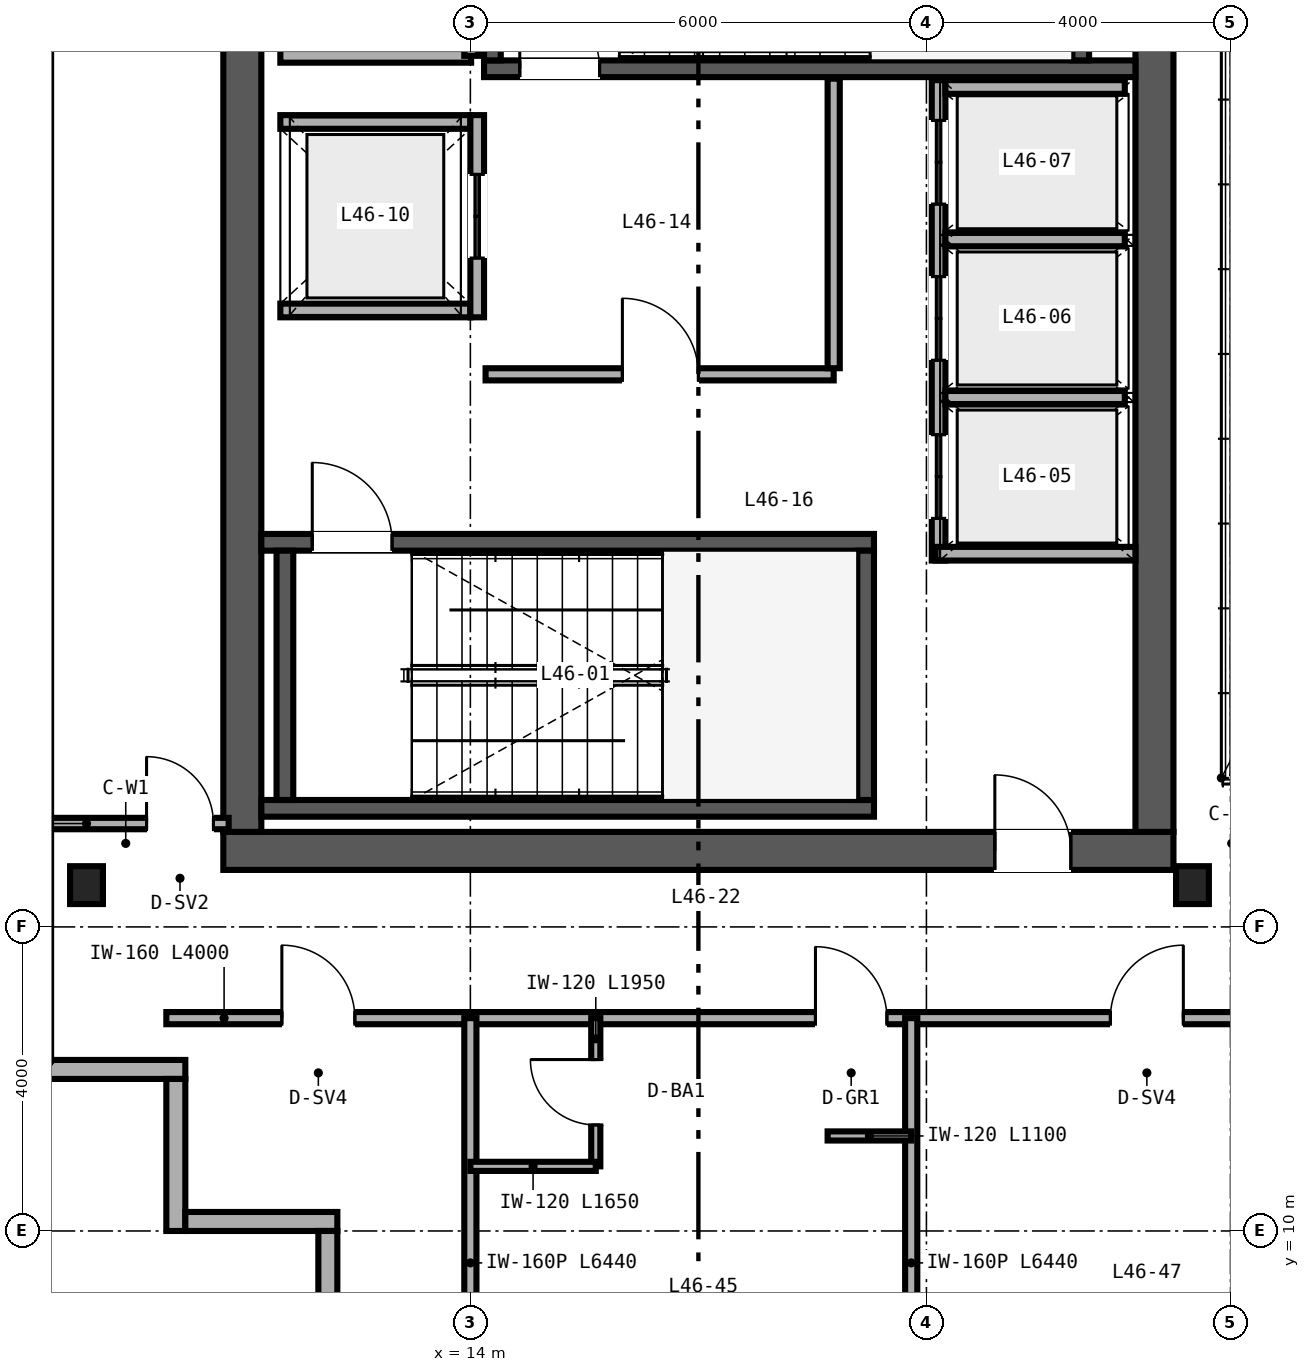
"""IFC4 building model, lengths in metres.
Left out: names, types, materials, properties, quantities, classifications, styles, units other than length and angle.
Written with IfcOpenShell. Run it as: python <this file> out.ifc"""

import sys

from ifc_helpers import new_model, si_unit, direction, frame, frame_2d, origin, origin_2d, place, context, subcontext, project, spatial, rectangle, i_section, extrude, source, transform, mapped, element, fill, save


model = new_model("IFC4")
c1 = context("Model", 3, precision=1e-05, world=origin(), true_north=direction((0.0, 1.0)))
c2 = subcontext(c1, "Body", "Model", "MODEL_VIEW")
j1 = project(units=[si_unit("LENGTHUNIT", "METRE"), si_unit("PLANEANGLEUNIT", "RADIAN")], contexts=[c1])
p1 = place(None, origin())
s1 = spatial("IfcSite", under=j1, at=p1, CompositionType="ELEMENT")
p2 = place(p1, origin())
s2 = spatial("IfcBuilding", under=s1, at=p2, CompositionType="ELEMENT")
p3 = place(p2, frame((0.0, 0.0, 184.8)))
s3 = spatial("IfcBuildingStorey", under=s2, at=p3, CompositionType="ELEMENT", Elevation=184.8)
p4 = place(p3, frame((10.75, 15.0, 0.0), z_axis=(0.0, 0.0, 1.0), x_axis=(1.0, 0.0, 0.0)))
e1 = element("IfcWall", 1, at=p4, inside=s3, PredefinedType="SHEAR", context=c2, shape_type="SweptSolid", body=[
    extrude(rectangle(XDim=12.5, YDim=0.5, at=frame_2d((6.25, 0.0))), origin(), (0.0, 0.0, 1.0), 3.37),
])
p5 = place(p4, frame((10.15, 0.0, 0.0)))
e2 = element("IfcOpeningElement", 2, at=p5, cuts=e1, PredefinedType="OPENING", context=c2, shape_type="SweptSolid", body=[
    extrude(rectangle(XDim=1.0, YDim=2.15, at=frame_2d((0.5, 1.075))), frame((0.0, 0.26, 0.0), z_axis=(0.0, -1.0, 0.0), x_axis=(1.0, 0.0, 0.0)), (0.0, 0.0, 1.0), 0.52),
])
for number, where, z_axis, x_axis in (
    (3, (11.0, 15.25, 0.0), (0.0, 0.0, 1.0), (0.0, 1.0, 0.0)),
    (4, (23.0, 15.25, 0.0), (0.0, 0.0, 1.0), (0.0, 1.0, 0.0)),
):
    element("IfcWall", number, at=place(p3, frame(where, z_axis=z_axis, x_axis=x_axis)), inside=s3, PredefinedType="SHEAR", context=c2, shape_type="SweptSolid", body=[
        extrude(rectangle(XDim=21.5, YDim=0.5, at=frame_2d((10.75, 0.0))), origin(), (0.0, 0.0, 1.0), 3.37),
    ])
p6 = place(p3, frame((11.25, 15.56, 0.0), z_axis=(0.0, 0.0, 1.0), x_axis=(1.0, 0.0, 0.0)))
e5 = element("IfcWall", 5, at=p6, inside=s3, PredefinedType="SHEAR", context=c2, shape_type="SweptSolid", body=[
    extrude(rectangle(XDim=8.06, YDim=0.22, at=frame_2d((4.03, 0.0))), origin(), (0.0, 0.0, 1.0), 3.4),
])
p7 = place(p3, frame((11.25, 19.06, 0.0), z_axis=(0.0, 0.0, 1.0), x_axis=(1.0, 0.0, 0.0)))
e6 = element("IfcWall", 6, at=p7, inside=s3, PredefinedType="SHEAR", context=c2, shape_type="SweptSolid", body=[
    extrude(rectangle(XDim=8.06, YDim=0.22, at=frame_2d((4.03, 0.0))), origin(), (0.0, 0.0, 1.0), 3.4),
])
p8 = place(p7, frame((0.67, 0.0, 0.0)))
e7 = element("IfcOpeningElement", 7, at=p8, cuts=e6, PredefinedType="OPENING", context=c2, shape_type="SweptSolid", body=[
    extrude(rectangle(XDim=1.05, YDim=2.15, at=frame_2d((0.525, 1.075))), frame((0.0, 0.12, 0.0), z_axis=(0.0, -1.0, 0.0), x_axis=(1.0, 0.0, 0.0)), (0.0, 0.0, 1.0), 0.24),
])
for number, where, z_axis, x_axis in (
    (8, (11.56, 15.67, 0.0), (0.0, 0.0, 1.0), (0.0, 1.0, 0.0)),
    (9, (19.2, 15.67, 0.0), (0.0, 0.0, 1.0), (0.0, 1.0, 0.0)),
):
    element("IfcWall", number, at=place(p3, frame(where, z_axis=z_axis, x_axis=x_axis)), inside=s3, PredefinedType="SHEAR", context=c2, shape_type="SweptSolid", body=[
        extrude(rectangle(XDim=3.28, YDim=0.22, at=frame_2d((1.64, 0.0))), origin(), (0.0, 0.0, 1.0), 3.4),
    ])
p9 = place(p3, frame((14.18, 25.29, 0.0), z_axis=(0.0, 0.0, 1.0), x_axis=(1.0, 0.0, 0.0)))
e10 = element("IfcWall", 10, at=p9, inside=s3, PredefinedType="SHEAR", context=c2, shape_type="SweptSolid", body=[
    extrude(rectangle(XDim=8.57, YDim=0.22, at=frame_2d((4.285, 0.0))), origin(), (0.0, 0.0, 1.0), 3.4),
])
p10 = place(p9, frame((0.47, 0.0, 0.0)))
e11 = element("IfcOpeningElement", 11, at=p10, cuts=e10, PredefinedType="OPENING", context=c2, shape_type="SweptSolid", body=[
    extrude(rectangle(XDim=1.05, YDim=2.15, at=frame_2d((0.525, 1.075))), frame((0.0, 0.12, 0.0), z_axis=(0.0, -1.0, 0.0), x_axis=(1.0, 0.0, 0.0)), (0.0, 0.0, 1.0), 0.24),
])
for number, where, z_axis, x_axis in (
    (12, (14.29, 25.4, 0.0), (0.0, 0.0, 1.0), (0.0, 1.0, 0.0)),
    (13, (22.03, 25.4, 0.0), (0.0, 0.0, 1.0), (0.0, 1.0, 0.0)),
):
    element("IfcWall", number, at=place(p3, frame(where, z_axis=z_axis, x_axis=x_axis)), inside=s3, PredefinedType="SHEAR", context=c2, shape_type="SweptSolid", body=[
        extrude(rectangle(XDim=3.28, YDim=0.22, at=frame_2d((1.64, 0.0))), origin(), (0.0, 0.0, 1.0), 3.4),
    ])
m1 = source(origin(), c2, "Body", "SweptSolid", [
    extrude(i_section(OverallWidth=0.432, OverallDepth=0.498, WebThickness=0.056, FlangeThickness=0.089, FilletRadius=0.025, at=origin_2d()), origin(), (0.0, 0.0, 1.0), 3.37),
])
for number, where, z_axis, x_axis in (
    (14, (8.95, 14.55, 0.0), (0.0, 0.0, 1.0), (1.0, 0.0, 0.0)),
    (15, (23.5, 14.55, 0.0), (0.0, 0.0, 1.0), (1.0, 0.0, 0.0)),
):
    element("IfcColumn", number, at=place(p3, frame(where, z_axis=z_axis, x_axis=x_axis)), inside=s3, PredefinedType="COLUMN", context=c2, shape_type="MappedRepresentation", body=[
        mapped(m1, transform((0.0, 0.0, 0.0), scale=1.0)),
    ])
p11 = place(p3, frame((8.0, 12.125, 0.0), z_axis=(0.0, 0.0, 1.0), x_axis=(1.0, 0.0, 0.0)))
e16 = element("IfcWall", 16, at=p11, inside=s3, PredefinedType="SOLIDWALL", context=c2, shape_type="SweptSolid", body=[
    extrude(rectangle(XDim=2.25, YDim=0.25, at=frame_2d((1.125, 0.0))), origin(), (0.0, 0.0, 1.0), 3.37),
])
for number, where, z_axis, x_axis in (
    (17, (10.125, 12.0, 0.0), (0.0, 0.0, 1.0), (0.0, -1.0, 0.0)),
    (18, (10.25, 10.125, 0.0), (0.0, 0.0, 1.0), (1.0, 0.0, 0.0)),
    (19, (12.125, 10.0, 0.0), (0.0, 0.0, 1.0), (0.0, -1.0, 0.0)),
):
    element("IfcWall", number, at=place(p3, frame(where, z_axis=z_axis, x_axis=x_axis)), inside=s3, PredefinedType="SOLIDWALL", context=c2, shape_type="SweptSolid", body=[
        extrude(rectangle(XDim=2.0, YDim=0.25, at=frame_2d((1.0, 0.0))), origin(), (0.0, 0.0, 1.0), 3.37),
    ])
p12 = place(p3, frame((20.16, 18.82, 0.0), z_axis=(0.0, 0.0, 1.0), x_axis=(0.0, 1.0, 0.0)))
e20 = element("IfcWall", 20, at=p12, inside=s3, PredefinedType="SOLIDWALL", context=c2, shape_type="SweptSolid", body=[
    extrude(rectangle(XDim=6.32, YDim=0.18, at=frame_2d((3.16, 0.0))), origin(), (0.0, 0.0, 1.0), 2.47),
])
p13 = place(p12, frame((0.555, 0.0, 0.0)))
e21 = element("IfcOpeningElement", 21, at=p13, cuts=e20, PredefinedType="OPENING", context=c2, shape_type="SweptSolid", body=[
    extrude(rectangle(XDim=1.1, YDim=2.2, at=frame_2d((0.55, 1.1))), frame((0.0, 0.1, 0.0), z_axis=(0.0, -1.0, 0.0), x_axis=(1.0, 0.0, 0.0)), (0.0, 0.0, 1.0), 0.2),
])
p14 = place(p12, frame((2.635, 0.0, 0.0)))
e22 = element("IfcOpeningElement", 22, at=p14, cuts=e20, PredefinedType="OPENING", context=c2, shape_type="SweptSolid", body=[
    extrude(rectangle(XDim=1.1, YDim=2.2, at=frame_2d((0.55, 1.1))), frame((0.0, 0.1, 0.0), z_axis=(0.0, -1.0, 0.0), x_axis=(1.0, 0.0, 0.0)), (0.0, 0.0, 1.0), 0.2),
])
p15 = place(p12, frame((4.69, 0.0, 0.0)))
e23 = element("IfcOpeningElement", 23, at=p15, cuts=e20, PredefinedType="OPENING", context=c2, shape_type="SweptSolid", body=[
    extrude(rectangle(XDim=1.1, YDim=2.2, at=frame_2d((0.55, 1.1))), frame((0.0, 0.1, 0.0), z_axis=(0.0, -1.0, 0.0), x_axis=(1.0, 0.0, 0.0)), (0.0, 0.0, 1.0), 0.2),
])
p16 = place(p3, frame((20.12, 18.91, 0.0), z_axis=(0.0, 0.0, 1.0), x_axis=(1.0, 0.0, 0.0)))
e24 = element("IfcWall", 24, at=p16, inside=s3, PredefinedType="SOLIDWALL", context=c2, shape_type="SweptSolid", body=[
    extrude(rectangle(XDim=2.63, YDim=0.18, at=frame_2d((1.315, 0.0))), origin(), (0.0, 0.0, 1.0), 3.37),
])
p17 = place(p3, frame((20.25, 25.05, 0.0), z_axis=(0.0, 0.0, 1.0), x_axis=(1.0, 0.0, 0.0)))
e25 = element("IfcWall", 25, at=p17, inside=s3, PredefinedType="SOLIDWALL", context=c2, shape_type="SweptSolid", body=[
    extrude(rectangle(XDim=2.36, YDim=0.18, at=frame_2d((1.18, 0.0))), origin(), (0.0, 0.0, 1.0), 3.37),
])
p18 = place(p3, frame((20.25, 20.965, 0.0), z_axis=(0.0, 0.0, 1.0), x_axis=(1.0, 0.0, 0.0)))
e26 = element("IfcWall", 26, at=p18, inside=s3, PredefinedType="SOLIDWALL", context=c2, shape_type="SweptSolid", body=[
    extrude(rectangle(XDim=2.36, YDim=0.18, at=frame_2d((1.18, 0.0))), origin(), (0.0, 0.0, 1.0), 2.47),
])
p19 = place(p3, frame((20.25, 23.045, 0.0), z_axis=(0.0, 0.0, 1.0), x_axis=(1.0, 0.0, 0.0)))
e27 = element("IfcWall", 27, at=p19, inside=s3, PredefinedType="SOLIDWALL", context=c2, shape_type="SweptSolid", body=[
    extrude(rectangle(XDim=2.36, YDim=0.18, at=frame_2d((1.18, 0.0))), origin(), (0.0, 0.0, 1.0), 3.37),
])
for number, where, z_axis, x_axis in (
    (28, (11.5, 22.11, 0.0), (0.0, 0.0, 1.0), (1.0, 0.0, 0.0)),
    (29, (11.5, 24.59, 0.0), (0.0, 0.0, 1.0), (1.0, 0.0, 0.0)),
):
    element("IfcWall", number, at=place(p3, frame(where, z_axis=z_axis, x_axis=x_axis)), inside=s3, PredefinedType="SOLIDWALL", context=c2, shape_type="SweptSolid", body=[
        extrude(rectangle(XDim=2.5, YDim=0.18, at=frame_2d((1.25, 0.0))), origin(), (0.0, 0.0, 1.0), 3.37),
    ])
p20 = place(p3, frame((14.09, 22.02, 0.0), z_axis=(0.0, 0.0, 1.0), x_axis=(0.0, 1.0, 0.0)))
e30 = element("IfcWall", 30, at=p20, inside=s3, PredefinedType="SOLIDWALL", context=c2, shape_type="SweptSolid", body=[
    extrude(rectangle(XDim=2.66, YDim=0.18, at=frame_2d((1.33, 0.0))), origin(), (0.0, 0.0, 1.0), 3.37),
])
p21 = place(p20, frame((0.78, 0.0, 0.0)))
e31 = element("IfcOpeningElement", 31, at=p21, cuts=e30, PredefinedType="OPENING", context=c2, shape_type="SweptSolid", body=[
    extrude(rectangle(XDim=1.1, YDim=2.2, at=frame_2d((0.55, 1.1))), frame((0.0, 0.1, 0.0), z_axis=(0.0, -1.0, 0.0), x_axis=(1.0, 0.0, 0.0)), (0.0, 0.0, 1.0), 0.2),
])
p22 = place(p3, frame((11.5, 25.46, 0.0), z_axis=(0.0, 0.0, 1.0), x_axis=(1.0, 0.0, 0.0)))
e32 = element("IfcWall", 32, at=p22, inside=s3, PredefinedType="SOLIDWALL", context=c2, shape_type="SweptSolid", body=[
    extrude(rectangle(XDim=2.51, YDim=0.18, at=frame_2d((1.255, 0.0))), origin(), (0.0, 0.0, 1.0), 3.37),
])
p23 = place(p3, frame((14.01, 25.46, 0.0), z_axis=(0.0, 0.0, 1.0), x_axis=(0.0, 1.0, 0.0)))
e33 = element("IfcWall", 33, at=p23, inside=s3, PredefinedType="SOLIDWALL", context=c2, shape_type="SweptSolid", body=[
    extrude(rectangle(XDim=3.08, YDim=0.18, at=frame_2d((1.54, 0.0))), origin(), (0.0, 0.0, 1.0), 3.37),
])
p24 = place(p3, frame((14.2, 21.27, 0.0), z_axis=(0.0, 0.0, 1.0), x_axis=(1.0, 0.0, 0.0)))
e34 = element("IfcWall", 34, at=p24, inside=s3, PredefinedType="PARTITIONING", context=c2, shape_type="SweptSolid", body=[
    extrude(rectangle(XDim=4.58, YDim=0.16, at=frame_2d((2.29, 0.0))), origin(), (0.0, 0.0, 1.0), 3.37),
])
p25 = place(p24, frame((1.8, 0.0, 0.0)))
e35 = element("IfcOpeningElement", 35, at=p25, cuts=e34, PredefinedType="OPENING", context=c2, shape_type="SweptSolid", body=[
    extrude(rectangle(XDim=1.0, YDim=2.15, at=frame_2d((0.5, 1.075))), frame((0.0, 0.09, 0.0), z_axis=(0.0, -1.0, 0.0), x_axis=(1.0, 0.0, 0.0)), (0.0, 0.0, 1.0), 0.18),
])
p26 = place(p3, frame((18.78, 21.35, 0.0), z_axis=(0.0, 0.0, 1.0), x_axis=(0.0, 1.0, 0.0)))
e36 = element("IfcWall", 36, at=p26, inside=s3, PredefinedType="PARTITIONING", context=c2, shape_type="SweptSolid", body=[
    extrude(rectangle(XDim=3.81, YDim=0.16, at=frame_2d((1.905, 0.0))), origin(), (0.0, 0.0, 1.0), 3.37),
])
p27 = place(p3, frame((8.16, 15.36, 0.0), z_axis=(0.0, 0.0, 1.0), x_axis=(1.0, 0.0, 0.0)))
e37 = element("IfcWall", 37, at=p27, inside=s3, PredefinedType="PARTITIONING", context=c2, shape_type="SweptSolid", body=[
    extrude(rectangle(XDim=2.66, YDim=0.15, at=frame_2d((1.33, 0.0))), origin(), (0.0, 0.0, 1.0), 2.591),
])
p28 = place(p27, frame((1.58, 0.0, 0.0)))
e38 = element("IfcOpeningElement", 38, at=p28, cuts=e37, PredefinedType="OPENING", context=c2, shape_type="SweptSolid", body=[
    extrude(rectangle(XDim=0.88, YDim=2.15, at=frame_2d((0.44, 1.075))), frame((0.0, 0.085, 0.0), z_axis=(0.0, -1.0, 0.0), x_axis=(1.0, 0.0, 0.0)), (0.0, 0.0, 1.0), 0.17),
])
p29 = place(p3, frame((10.0, 12.8, 0.0), z_axis=(0.0, 0.0, 1.0), x_axis=(1.0, 0.0, 0.0)))
e39 = element("IfcWall", 39, at=p29, inside=s3, PredefinedType="PARTITIONING", context=c2, shape_type="SweptSolid", body=[
    extrude(rectangle(XDim=4.0, YDim=0.16, at=frame_2d((2.0, 0.0))), origin(), (0.0, 0.0, 1.0), 3.37),
])
p30 = place(p29, frame((1.52, 0.0, 0.0)))
e40 = element("IfcOpeningElement", 40, at=p30, cuts=e39, PredefinedType="OPENING", context=c2, shape_type="SweptSolid", body=[
    extrude(rectangle(XDim=0.96, YDim=2.15, at=frame_2d((0.48, 1.075))), frame((0.0, 0.09, 0.0), z_axis=(0.0, -1.0, 0.0), x_axis=(1.0, 0.0, 0.0)), (0.0, 0.0, 1.0), 0.18),
])
p31 = place(p3, frame((14.0, 12.8, 0.0), z_axis=(0.0, 0.0, 1.0), x_axis=(1.0, 0.0, 0.0)))
e41 = element("IfcWall", 41, at=p31, inside=s3, PredefinedType="PARTITIONING", context=c2, shape_type="SweptSolid", body=[
    extrude(rectangle(XDim=12.0, YDim=0.16, at=frame_2d((6.0, 0.0))), origin(), (0.0, 0.0, 1.0), 2.913),
])
p32 = place(p31, frame((4.54, 0.0, 0.0)))
e42 = element("IfcOpeningElement", 42, at=p32, cuts=e41, PredefinedType="OPENING", context=c2, shape_type="SweptSolid", body=[
    extrude(rectangle(XDim=0.94, YDim=2.15, at=frame_2d((0.47, 1.075))), frame((0.0, 0.09, 0.0), z_axis=(0.0, -1.0, 0.0), x_axis=(1.0, 0.0, 0.0)), (0.0, 0.0, 1.0), 0.18),
])
p33 = place(p31, frame((8.42, 0.0, 0.0)))
e43 = element("IfcOpeningElement", 43, at=p33, cuts=e41, PredefinedType="OPENING", context=c2, shape_type="SweptSolid", body=[
    extrude(rectangle(XDim=0.96, YDim=2.15, at=frame_2d((0.48, 1.075))), frame((0.0, 0.09, 0.0), z_axis=(0.0, -1.0, 0.0), x_axis=(1.0, 0.0, 0.0)), (0.0, 0.0, 1.0), 0.18),
])
for number, where, z_axis, x_axis in (
    (44, (14.0, 6.36, 0.0), (0.0, 0.0, 1.0), (0.0, 1.0, 0.0)),
    (45, (19.8, 6.36, 0.0), (0.0, 0.0, 1.0), (0.0, 1.0, 0.0)),
):
    element("IfcWall", number, at=place(p3, frame(where, z_axis=z_axis, x_axis=x_axis)), inside=s3, PredefinedType="PARTITIONING", context=c2, shape_type="SweptSolid", body=[
        extrude(rectangle(XDim=6.44, YDim=0.16, at=frame_2d((3.22, 0.0))), origin(), (0.0, 0.0, 1.0), 2.677),
    ])
p34 = place(p3, frame((15.65, 10.85, 0.0), z_axis=(0.0, 0.0, 1.0), x_axis=(0.0, 1.0, 0.0)))
e46 = element("IfcWall", 46, at=p34, inside=s3, PredefinedType="PARTITIONING", context=c2, shape_type="SweptSolid", body=[
    extrude(rectangle(XDim=1.95, YDim=0.12, at=frame_2d((0.975, 0.0))), origin(), (0.0, 0.0, 1.0), 3.37),
])
p35 = place(p34, frame((0.545, 0.0, 0.0)))
e47 = element("IfcOpeningElement", 47, at=p35, cuts=e46, PredefinedType="OPENING", context=c2, shape_type="SweptSolid", body=[
    extrude(rectangle(XDim=0.86, YDim=2.1, at=frame_2d((0.43, 1.05))), frame((0.0, 0.07, 0.0), z_axis=(0.0, -1.0, 0.0), x_axis=(1.0, 0.0, 0.0)), (0.0, 0.0, 1.0), 0.14),
])
p36 = place(p3, frame((14.0, 10.85, 0.0), z_axis=(0.0, 0.0, 1.0), x_axis=(1.0, 0.0, 0.0)))
e48 = element("IfcWall", 48, at=p36, inside=s3, PredefinedType="PARTITIONING", context=c2, shape_type="SweptSolid", body=[
    extrude(rectangle(XDim=1.65, YDim=0.12, at=frame_2d((0.825, 0.0))), origin(), (0.0, 0.0, 1.0), 3.37),
])
p37 = place(p3, frame((18.7, 11.25, 0.0), z_axis=(0.0, 0.0, 1.0), x_axis=(1.0, 0.0, 0.0)))
e49 = element("IfcWall", 49, at=p37, inside=s3, PredefinedType="PARTITIONING", context=c2, shape_type="SweptSolid", body=[
    extrude(rectangle(XDim=1.1, YDim=0.12, at=frame_2d((0.55, 0.0))), origin(), (0.0, 0.0, 1.0), 3.37),
])
m2 = source(origin(), c2, "Body", "SweptSolid", [
    extrude(rectangle(XDim=1.05, YDim=2.15, at=frame_2d((0.525, 1.075))), frame((0.0, 0.025, 0.0), z_axis=(0.0, -1.0, 0.0), x_axis=(1.0, 0.0, 0.0)), (0.0, 0.0, 1.0), 0.05),
])
p38 = place(p8, origin())
e50 = element("IfcDoor", 50, at=p38, inside=s3, OperationType="SINGLE_SWING_LEFT", PredefinedType="DOOR", context=c2, shape_type="MappedRepresentation", body=[
    mapped(m2, transform((0.0, 0.0, 0.0), scale=1.0)),
])
fill(e7, e50)
p39 = place(p10, origin())
e51 = element("IfcDoor", 51, at=p39, inside=s3, OperationType="SINGLE_SWING_LEFT", PredefinedType="DOOR", context=c2, shape_type="MappedRepresentation", body=[
    mapped(m2, transform((0.0, 0.0, 0.0), scale=1.0)),
])
fill(e11, e51)
m3 = source(origin(), c2, "Body", "SweptSolid", [
    extrude(rectangle(XDim=1.1, YDim=2.2, at=frame_2d((0.55, 1.1))), frame((0.0, 0.025, 0.0), z_axis=(0.0, -1.0, 0.0), x_axis=(1.0, 0.0, 0.0)), (0.0, 0.0, 1.0), 0.05),
])
p40 = place(p13, origin())
e52 = element("IfcDoor", 52, at=p40, inside=s3, OperationType="DOUBLE_DOOR_SLIDING", PredefinedType="DOOR", context=c2, shape_type="MappedRepresentation", body=[
    mapped(m3, transform((0.0, 0.0, 0.0), scale=1.0)),
])
fill(e21, e52)
p41 = place(p14, origin())
e53 = element("IfcDoor", 53, at=p41, inside=s3, OperationType="DOUBLE_DOOR_SLIDING", PredefinedType="DOOR", context=c2, shape_type="MappedRepresentation", body=[
    mapped(m3, transform((0.0, 0.0, 0.0), scale=1.0)),
])
fill(e22, e53)
p42 = place(p15, origin())
e54 = element("IfcDoor", 54, at=p42, inside=s3, OperationType="DOUBLE_DOOR_SLIDING", PredefinedType="DOOR", context=c2, shape_type="MappedRepresentation", body=[
    mapped(m3, transform((0.0, 0.0, 0.0), scale=1.0)),
])
fill(e23, e54)
p43 = place(p21, origin())
e55 = element("IfcDoor", 55, at=p43, inside=s3, OperationType="DOUBLE_DOOR_SLIDING", PredefinedType="DOOR", context=c2, shape_type="MappedRepresentation", body=[
    mapped(m3, transform((0.0, 0.0, 0.0), scale=1.0)),
])
fill(e31, e55)
m4 = source(origin(), c2, "Body", "SweptSolid", [
    extrude(rectangle(XDim=1.0, YDim=2.15, at=frame_2d((0.5, 1.075))), frame((0.0, 0.025, 0.0), z_axis=(0.0, -1.0, 0.0), x_axis=(1.0, 0.0, 0.0)), (0.0, 0.0, 1.0), 0.05),
])
p44 = place(p25, origin())
e56 = element("IfcDoor", 56, at=p44, inside=s3, OperationType="SINGLE_SWING_LEFT", PredefinedType="DOOR", context=c2, shape_type="MappedRepresentation", body=[
    mapped(m4, transform((0.0, 0.0, 0.0), scale=1.0)),
])
fill(e35, e56)
p45 = place(p5, origin())
e57 = element("IfcDoor", 57, at=p45, inside=s3, OperationType="SINGLE_SWING_LEFT", PredefinedType="DOOR", context=c2, shape_type="MappedRepresentation", body=[
    mapped(m4, transform((0.0, 0.0, 0.0), scale=1.0)),
])
fill(e2, e57)
m5 = source(origin(), c2, "Body", "SweptSolid", [
    extrude(rectangle(XDim=0.88, YDim=2.15, at=frame_2d((0.44, 1.075))), frame((0.0, 0.025, 0.0), z_axis=(0.0, -1.0, 0.0), x_axis=(1.0, 0.0, 0.0)), (0.0, 0.0, 1.0), 0.05),
])
p46 = place(p28, origin())
e58 = element("IfcDoor", 58, at=p46, inside=s3, OperationType="SINGLE_SWING_LEFT", PredefinedType="DOOR", context=c2, shape_type="MappedRepresentation", body=[
    mapped(m5, transform((0.0, 0.0, 0.0), scale=1.0)),
])
fill(e38, e58)
m6 = source(origin(), c2, "Body", "SweptSolid", [
    extrude(rectangle(XDim=0.96, YDim=2.15, at=frame_2d((0.48, 1.075))), frame((0.0, 0.025, 0.0), z_axis=(0.0, -1.0, 0.0), x_axis=(1.0, 0.0, 0.0)), (0.0, 0.0, 1.0), 0.05),
])
p47 = place(p30, origin())
e59 = element("IfcDoor", 59, at=p47, inside=s3, OperationType="SINGLE_SWING_LEFT", PredefinedType="DOOR", context=c2, shape_type="MappedRepresentation", body=[
    mapped(m6, transform((0.0, 0.0, 0.0), scale=1.0)),
])
fill(e40, e59)
m7 = source(origin(), c2, "Body", "SweptSolid", [
    extrude(rectangle(XDim=0.86, YDim=2.1, at=frame_2d((0.43, 1.05))), frame((0.0, 0.025, 0.0), z_axis=(0.0, -1.0, 0.0), x_axis=(1.0, 0.0, 0.0)), (0.0, 0.0, 1.0), 0.05),
])
p48 = place(p35, origin())
e60 = element("IfcDoor", 60, at=p48, inside=s3, OperationType="SINGLE_SWING_RIGHT", PredefinedType="DOOR", context=c2, shape_type="MappedRepresentation", body=[
    mapped(m7, transform((0.0, 0.0, 0.0), scale=1.0)),
])
fill(e47, e60)
m8 = source(origin(), c2, "Body", "SweptSolid", [
    extrude(rectangle(XDim=0.94, YDim=2.15, at=frame_2d((0.47, 1.075))), frame((0.0, 0.025, 0.0), z_axis=(0.0, -1.0, 0.0), x_axis=(1.0, 0.0, 0.0)), (0.0, 0.0, 1.0), 0.05),
])
p49 = place(p32, origin())
e61 = element("IfcDoor", 61, at=p49, inside=s3, OperationType="SINGLE_SWING_LEFT", PredefinedType="DOOR", context=c2, shape_type="MappedRepresentation", body=[
    mapped(m8, transform((0.0, 0.0, 0.0), scale=1.0)),
])
fill(e42, e61)
p50 = place(p33, origin())
e62 = element("IfcDoor", 62, at=p50, inside=s3, OperationType="SINGLE_SWING_RIGHT", PredefinedType="DOOR", context=c2, shape_type="MappedRepresentation", body=[
    mapped(m6, transform((0.0, 0.0, 0.0), scale=1.0)),
])
fill(e43, e62)
save(model, sys.argv[1])
